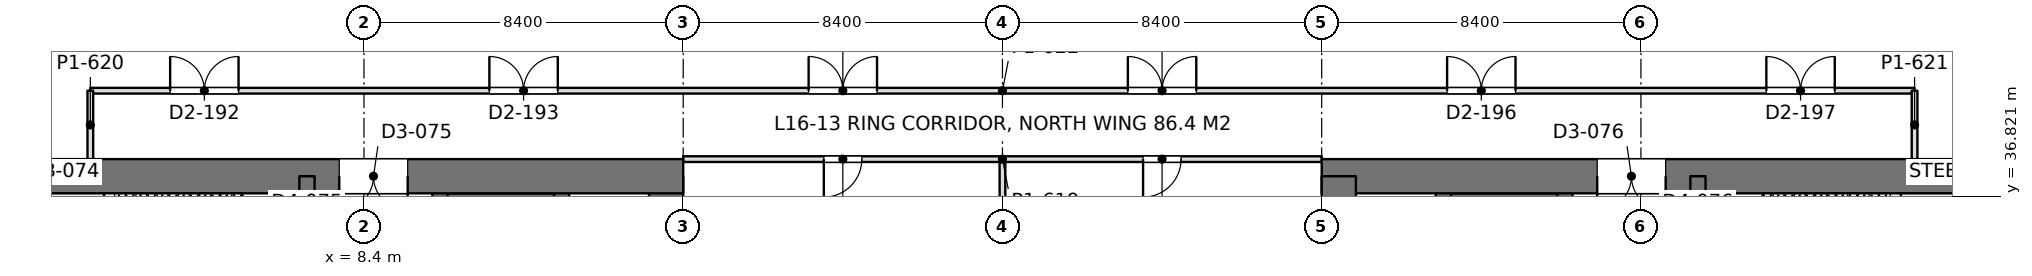
"""IFC4 building model, lengths in metres.
Left out: names, types, materials, properties, quantities, classifications, styles, units other than length and angle.
Written with IfcOpenShell. Run it as: python <this file> out.ifc"""

import sys

from ifc_helpers import new_model, si_unit, direction, frame, frame_2d, origin, place, context, subcontext, project, spatial, rectangle, extrude, element, fill, save


model = new_model("IFC4")
c1 = context("Model", 3, precision=1e-05, world=origin(), true_north=direction((0.0, 1.0)))
c2 = subcontext(c1, "Body", "Model", "MODEL_VIEW")
j1 = project(units=[si_unit("LENGTHUNIT", "METRE"), si_unit("PLANEANGLEUNIT", "RADIAN")], contexts=[c1])
p1 = place(None, origin())
s1 = spatial("IfcSite", under=j1, at=p1, CompositionType="ELEMENT")
p2 = place(p1, origin())
s2 = spatial("IfcBuilding", under=s1, at=p2, CompositionType="ELEMENT")
p3 = place(p2, frame((0.0, 0.0, 72.9)))
s3 = spatial("IfcBuildingStorey", under=s2, at=p3, CompositionType="ELEMENT", Elevation=72.9)
p4 = place(p3, frame((-1.2, 37.35, 0.0), z_axis=(0.0, 0.0, 1.0), x_axis=(1.0, 0.0, 0.0)))
e1 = element("IfcWall", 1, at=p4, inside=s3, PredefinedType="SHEAR", context=c2, shape_type="SweptSolid", body=[
    extrude(rectangle(XDim=18.0, YDim=0.9, at=frame_2d((9.0, 0.0))), origin(), (0.0, 0.0, 1.0), 4.5),
])
p5 = place(p4, frame((8.95, 0.0, 0.0)))
e2 = element("IfcOpeningElement", 2, at=p5, cuts=e1, PredefinedType="OPENING", context=c2, shape_type="SweptSolid", body=[
    extrude(rectangle(XDim=1.8, YDim=2.4, at=frame_2d((0.9, 1.2))), frame((0.0, 0.46, 0.0), z_axis=(0.0, -1.0, 0.0), x_axis=(1.0, 0.0, 0.0)), (0.0, 0.0, 1.0), 0.92),
])
p6 = place(p3, frame((16.35, 13.05, 0.0), z_axis=(0.0, 0.0, 1.0), x_axis=(0.0, 1.0, 0.0)))
e3 = element("IfcWall", 3, at=p6, inside=s3, PredefinedType="SHEAR", context=c2, shape_type="SweptSolid", body=[
    extrude(rectangle(XDim=24.3, YDim=0.9, at=frame_2d((12.15, 0.0))), origin(), (0.0, 0.0, 1.0), 4.5),
])
p7 = place(p3, frame((6.9, 13.05, 0.0), z_axis=(0.0, 0.0, 1.0), x_axis=(0.0, 1.0, 0.0)))
e4 = element("IfcWall", 4, at=p7, inside=s3, PredefinedType="SHEAR", context=c2, shape_type="SweptSolid", body=[
    extrude(rectangle(XDim=24.3, YDim=0.4, at=frame_2d((12.15, 0.0))), origin(), (0.0, 0.0, 1.0), 4.5),
])
p8 = place(p7, frame((1.3, 0.0, 0.0)))
e5 = element("IfcOpeningElement", 5, at=p8, cuts=e4, PredefinedType="OPENING", context=c2, shape_type="SweptSolid", body=[
    extrude(rectangle(XDim=1.0, YDim=2.2, at=frame_2d((0.5, 1.1))), frame((0.0, 0.21, 0.0), z_axis=(0.0, -1.0, 0.0), x_axis=(1.0, 0.0, 0.0)), (0.0, 0.0, 1.0), 0.42),
])
p9 = place(p7, frame((22.0, 0.0, 0.0)))
e6 = element("IfcOpeningElement", 6, at=p9, cuts=e4, PredefinedType="OPENING", context=c2, shape_type="SweptSolid", body=[
    extrude(rectangle(XDim=1.0, YDim=2.2, at=frame_2d((0.5, 1.1))), frame((0.0, 0.21, 0.0), z_axis=(0.0, -1.0, 0.0), x_axis=(1.0, 0.0, 0.0)), (0.0, 0.0, 1.0), 0.42),
])
p10 = place(p7, frame((5.55, 0.0, 0.0)))
e7 = element("IfcOpeningElement", 7, at=p10, cuts=e4, PredefinedType="OPENING", context=c2, shape_type="SweptSolid", body=[
    extrude(rectangle(XDim=1.0, YDim=2.2, at=frame_2d((0.5, 1.1))), frame((0.0, 0.21, 0.0), z_axis=(0.0, -1.0, 0.0), x_axis=(1.0, 0.0, 0.0)), (0.0, 0.0, 1.0), 0.42),
])
p11 = place(p7, frame((9.55, 0.0, 0.0)))
e8 = element("IfcOpeningElement", 8, at=p11, cuts=e4, PredefinedType="OPENING", context=c2, shape_type="SweptSolid", body=[
    extrude(rectangle(XDim=1.0, YDim=2.2, at=frame_2d((0.5, 1.1))), frame((0.0, 0.21, 0.0), z_axis=(0.0, -1.0, 0.0), x_axis=(1.0, 0.0, 0.0)), (0.0, 0.0, 1.0), 0.42),
])
p12 = place(p7, frame((12.8, 0.0, 0.0)))
e9 = element("IfcOpeningElement", 9, at=p12, cuts=e4, PredefinedType="OPENING", context=c2, shape_type="SweptSolid", body=[
    extrude(rectangle(XDim=1.1, YDim=2.2, at=frame_2d((0.55, 1.1))), frame((0.0, 0.21, 0.0), z_axis=(0.0, -1.0, 0.0), x_axis=(1.0, 0.0, 0.0)), (0.0, 0.0, 1.0), 0.42),
])
p13 = place(p7, frame((15.538, 0.0, 0.0)))
e10 = element("IfcOpeningElement", 10, at=p13, cuts=e4, PredefinedType="OPENING", context=c2, shape_type="SweptSolid", body=[
    extrude(rectangle(XDim=1.1, YDim=2.2, at=frame_2d((0.55, 1.1))), frame((0.0, 0.21, 0.0), z_axis=(0.0, -1.0, 0.0), x_axis=(1.0, 0.0, 0.0)), (0.0, 0.0, 1.0), 0.42),
])
p14 = place(p7, frame((18.262, 0.0, 0.0)))
e11 = element("IfcOpeningElement", 11, at=p14, cuts=e4, PredefinedType="OPENING", context=c2, shape_type="SweptSolid", body=[
    extrude(rectangle(XDim=1.1, YDim=2.2, at=frame_2d((0.55, 1.1))), frame((0.0, 0.21, 0.0), z_axis=(0.0, -1.0, 0.0), x_axis=(1.0, 0.0, 0.0)), (0.0, 0.0, 1.0), 0.42),
])
p15 = place(p3, frame((10.4, 13.05, 0.0), z_axis=(0.0, 0.0, 1.0), x_axis=(0.0, 1.0, 0.0)))
e12 = element("IfcWall", 12, at=p15, inside=s3, PredefinedType="SHEAR", context=c2, shape_type="SweptSolid", body=[
    extrude(rectangle(XDim=24.3, YDim=0.4, at=frame_2d((12.15, 0.0))), origin(), (0.0, 0.0, 1.0), 4.5),
])
p16 = place(p15, frame((1.5, 0.0, 0.0)))
e13 = element("IfcOpeningElement", 13, at=p16, cuts=e12, PredefinedType="OPENING", context=c2, shape_type="SweptSolid", body=[
    extrude(rectangle(XDim=1.1, YDim=2.2, at=frame_2d((0.55, 1.1))), frame((0.0, 0.21, 0.0), z_axis=(0.0, -1.0, 0.0), x_axis=(1.0, 0.0, 0.0)), (0.0, 0.0, 1.0), 0.42),
])
p17 = place(p15, frame((4.35, 0.0, 0.0)))
e14 = element("IfcOpeningElement", 14, at=p17, cuts=e12, PredefinedType="OPENING", context=c2, shape_type="SweptSolid", body=[
    extrude(rectangle(XDim=1.1, YDim=2.2, at=frame_2d((0.55, 1.1))), frame((0.0, 0.21, 0.0), z_axis=(0.0, -1.0, 0.0), x_axis=(1.0, 0.0, 0.0)), (0.0, 0.0, 1.0), 0.42),
])
p18 = place(p15, frame((7.2, 0.0, 0.0)))
e15 = element("IfcOpeningElement", 15, at=p18, cuts=e12, PredefinedType="OPENING", context=c2, shape_type="SweptSolid", body=[
    extrude(rectangle(XDim=1.1, YDim=2.2, at=frame_2d((0.55, 1.1))), frame((0.0, 0.21, 0.0), z_axis=(0.0, -1.0, 0.0), x_axis=(1.0, 0.0, 0.0)), (0.0, 0.0, 1.0), 0.42),
])
p19 = place(p15, frame((21.45, 0.0, 0.0)))
e16 = element("IfcOpeningElement", 16, at=p19, cuts=e12, PredefinedType="OPENING", context=c2, shape_type="SweptSolid", body=[
    extrude(rectangle(XDim=1.1, YDim=2.2, at=frame_2d((0.55, 1.1))), frame((0.0, 0.21, 0.0), z_axis=(0.0, -1.0, 0.0), x_axis=(1.0, 0.0, 0.0)), (0.0, 0.0, 1.0), 0.42),
])
p20 = place(p3, frame((13.6, 13.05, 0.0), z_axis=(0.0, 0.0, 1.0), x_axis=(0.0, 1.0, 0.0)))
e17 = element("IfcWall", 17, at=p20, inside=s3, PredefinedType="SHEAR", context=c2, shape_type="SweptSolid", body=[
    extrude(rectangle(XDim=24.3, YDim=0.4, at=frame_2d((12.15, 0.0))), origin(), (0.0, 0.0, 1.0), 4.5),
])
p21 = place(p3, frame((10.4, 36.625, 0.0), z_axis=(0.0, 0.0, 1.0), x_axis=(1.0, 0.0, 0.0)))
e18 = element("IfcWall", 18, at=p21, inside=s3, PredefinedType="SHEAR", context=c2, shape_type="SweptSolid", body=[
    extrude(rectangle(XDim=3.2, YDim=0.55, at=frame_2d((1.6, 0.0))), origin(), (0.0, 0.0, 1.0), 4.5),
])
p22 = place(p3, frame((33.6, 37.35, 0.0), z_axis=(0.0, 0.0, 1.0), x_axis=(1.0, 0.0, 0.0)))
e19 = element("IfcWall", 19, at=p22, inside=s3, PredefinedType="SHEAR", context=c2, shape_type="SweptSolid", body=[
    extrude(rectangle(XDim=18.0, YDim=0.9, at=frame_2d((9.0, 0.0))), origin(), (0.0, 0.0, 1.0), 4.5),
])
p23 = place(p22, frame((7.25, 0.0, 0.0)))
e20 = element("IfcOpeningElement", 20, at=p23, cuts=e19, PredefinedType="OPENING", context=c2, shape_type="SweptSolid", body=[
    extrude(rectangle(XDim=1.8, YDim=2.4, at=frame_2d((0.9, 1.2))), frame((0.0, 0.46, 0.0), z_axis=(0.0, -1.0, 0.0), x_axis=(1.0, 0.0, 0.0)), (0.0, 0.0, 1.0), 0.92),
])
p24 = place(p3, frame((34.05, 13.05, 0.0), z_axis=(0.0, 0.0, 1.0), x_axis=(0.0, 1.0, 0.0)))
e21 = element("IfcWall", 21, at=p24, inside=s3, PredefinedType="SHEAR", context=c2, shape_type="SweptSolid", body=[
    extrude(rectangle(XDim=24.3, YDim=0.9, at=frame_2d((12.15, 0.0))), origin(), (0.0, 0.0, 1.0), 4.5),
])
p25 = place(p3, frame((43.5, 13.05, 0.0), z_axis=(0.0, 0.0, 1.0), x_axis=(0.0, 1.0, 0.0)))
e22 = element("IfcWall", 22, at=p25, inside=s3, PredefinedType="SHEAR", context=c2, shape_type="SweptSolid", body=[
    extrude(rectangle(XDim=24.3, YDim=0.4, at=frame_2d((12.15, 0.0))), origin(), (0.0, 0.0, 1.0), 4.5),
])
p26 = place(p25, frame((1.3, 0.0, 0.0)))
e23 = element("IfcOpeningElement", 23, at=p26, cuts=e22, PredefinedType="OPENING", context=c2, shape_type="SweptSolid", body=[
    extrude(rectangle(XDim=1.0, YDim=2.2, at=frame_2d((0.5, 1.1))), frame((0.0, 0.21, 0.0), z_axis=(0.0, -1.0, 0.0), x_axis=(1.0, 0.0, 0.0)), (0.0, 0.0, 1.0), 0.42),
])
p27 = place(p25, frame((22.0, 0.0, 0.0)))
e24 = element("IfcOpeningElement", 24, at=p27, cuts=e22, PredefinedType="OPENING", context=c2, shape_type="SweptSolid", body=[
    extrude(rectangle(XDim=1.0, YDim=2.2, at=frame_2d((0.5, 1.1))), frame((0.0, 0.21, 0.0), z_axis=(0.0, -1.0, 0.0), x_axis=(1.0, 0.0, 0.0)), (0.0, 0.0, 1.0), 0.42),
])
p28 = place(p25, frame((5.55, 0.0, 0.0)))
e25 = element("IfcOpeningElement", 25, at=p28, cuts=e22, PredefinedType="OPENING", context=c2, shape_type="SweptSolid", body=[
    extrude(rectangle(XDim=1.0, YDim=2.2, at=frame_2d((0.5, 1.1))), frame((0.0, 0.21, 0.0), z_axis=(0.0, -1.0, 0.0), x_axis=(1.0, 0.0, 0.0)), (0.0, 0.0, 1.0), 0.42),
])
p29 = place(p25, frame((9.55, 0.0, 0.0)))
e26 = element("IfcOpeningElement", 26, at=p29, cuts=e22, PredefinedType="OPENING", context=c2, shape_type="SweptSolid", body=[
    extrude(rectangle(XDim=1.0, YDim=2.2, at=frame_2d((0.5, 1.1))), frame((0.0, 0.21, 0.0), z_axis=(0.0, -1.0, 0.0), x_axis=(1.0, 0.0, 0.0)), (0.0, 0.0, 1.0), 0.42),
])
p30 = place(p25, frame((12.8, 0.0, 0.0)))
e27 = element("IfcOpeningElement", 27, at=p30, cuts=e22, PredefinedType="OPENING", context=c2, shape_type="SweptSolid", body=[
    extrude(rectangle(XDim=1.1, YDim=2.2, at=frame_2d((0.55, 1.1))), frame((0.0, 0.21, 0.0), z_axis=(0.0, -1.0, 0.0), x_axis=(1.0, 0.0, 0.0)), (0.0, 0.0, 1.0), 0.42),
])
p31 = place(p25, frame((15.538, 0.0, 0.0)))
e28 = element("IfcOpeningElement", 28, at=p31, cuts=e22, PredefinedType="OPENING", context=c2, shape_type="SweptSolid", body=[
    extrude(rectangle(XDim=1.1, YDim=2.2, at=frame_2d((0.55, 1.1))), frame((0.0, 0.21, 0.0), z_axis=(0.0, -1.0, 0.0), x_axis=(1.0, 0.0, 0.0)), (0.0, 0.0, 1.0), 0.42),
])
p32 = place(p25, frame((18.262, 0.0, 0.0)))
e29 = element("IfcOpeningElement", 29, at=p32, cuts=e22, PredefinedType="OPENING", context=c2, shape_type="SweptSolid", body=[
    extrude(rectangle(XDim=1.1, YDim=2.2, at=frame_2d((0.55, 1.1))), frame((0.0, 0.21, 0.0), z_axis=(0.0, -1.0, 0.0), x_axis=(1.0, 0.0, 0.0)), (0.0, 0.0, 1.0), 0.42),
])
p33 = place(p3, frame((40.0, 13.05, 0.0), z_axis=(0.0, 0.0, 1.0), x_axis=(0.0, 1.0, 0.0)))
e30 = element("IfcWall", 30, at=p33, inside=s3, PredefinedType="SHEAR", context=c2, shape_type="SweptSolid", body=[
    extrude(rectangle(XDim=24.3, YDim=0.4, at=frame_2d((12.15, 0.0))), origin(), (0.0, 0.0, 1.0), 4.5),
])
p34 = place(p33, frame((1.5, 0.0, 0.0)))
e31 = element("IfcOpeningElement", 31, at=p34, cuts=e30, PredefinedType="OPENING", context=c2, shape_type="SweptSolid", body=[
    extrude(rectangle(XDim=1.1, YDim=2.2, at=frame_2d((0.55, 1.1))), frame((0.0, 0.21, 0.0), z_axis=(0.0, -1.0, 0.0), x_axis=(1.0, 0.0, 0.0)), (0.0, 0.0, 1.0), 0.42),
])
p35 = place(p33, frame((4.35, 0.0, 0.0)))
e32 = element("IfcOpeningElement", 32, at=p35, cuts=e30, PredefinedType="OPENING", context=c2, shape_type="SweptSolid", body=[
    extrude(rectangle(XDim=1.1, YDim=2.2, at=frame_2d((0.55, 1.1))), frame((0.0, 0.21, 0.0), z_axis=(0.0, -1.0, 0.0), x_axis=(1.0, 0.0, 0.0)), (0.0, 0.0, 1.0), 0.42),
])
p36 = place(p33, frame((7.2, 0.0, 0.0)))
e33 = element("IfcOpeningElement", 33, at=p36, cuts=e30, PredefinedType="OPENING", context=c2, shape_type="SweptSolid", body=[
    extrude(rectangle(XDim=1.1, YDim=2.2, at=frame_2d((0.55, 1.1))), frame((0.0, 0.21, 0.0), z_axis=(0.0, -1.0, 0.0), x_axis=(1.0, 0.0, 0.0)), (0.0, 0.0, 1.0), 0.42),
])
p37 = place(p33, frame((21.45, 0.0, 0.0)))
e34 = element("IfcOpeningElement", 34, at=p37, cuts=e30, PredefinedType="OPENING", context=c2, shape_type="SweptSolid", body=[
    extrude(rectangle(XDim=1.1, YDim=2.2, at=frame_2d((0.55, 1.1))), frame((0.0, 0.21, 0.0), z_axis=(0.0, -1.0, 0.0), x_axis=(1.0, 0.0, 0.0)), (0.0, 0.0, 1.0), 0.42),
])
p38 = place(p3, frame((36.8, 13.05, 0.0), z_axis=(0.0, 0.0, 1.0), x_axis=(0.0, 1.0, 0.0)))
e35 = element("IfcWall", 35, at=p38, inside=s3, PredefinedType="SHEAR", context=c2, shape_type="SweptSolid", body=[
    extrude(rectangle(XDim=24.3, YDim=0.4, at=frame_2d((12.15, 0.0))), origin(), (0.0, 0.0, 1.0), 4.5),
])
p39 = place(p3, frame((40.0, 36.625, 0.0), z_axis=(0.0, 0.0, 1.0), x_axis=(-1.0, 0.0, 0.0)))
e36 = element("IfcWall", 36, at=p39, inside=s3, PredefinedType="SHEAR", context=c2, shape_type="SweptSolid", body=[
    extrude(rectangle(XDim=3.2, YDim=0.55, at=frame_2d((1.6, 0.0))), origin(), (0.0, 0.0, 1.0), 4.5),
])
p40 = place(p3, frame((1.2, 39.6, 0.0), z_axis=(0.0, 0.0, 1.0), x_axis=(1.0, 0.0, 0.0)))
e37 = element("IfcWall", 37, at=p40, inside=s3, PredefinedType="PARTITIONING", context=c2, shape_type="SweptSolid", body=[
    extrude(rectangle(XDim=48.0, YDim=0.15, at=frame_2d((24.0, 0.0))), origin(), (0.0, 0.0, 1.0), 3.74),
])
p41 = place(p40, frame((2.1, 0.0, 0.0)))
e38 = element("IfcOpeningElement", 38, at=p41, cuts=e37, PredefinedType="OPENING", context=c2, shape_type="SweptSolid", body=[
    extrude(rectangle(XDim=1.8, YDim=2.2, at=frame_2d((0.9, 1.1))), frame((0.0, 0.085, 0.0), z_axis=(0.0, -1.0, 0.0), x_axis=(1.0, 0.0, 0.0)), (0.0, 0.0, 1.0), 0.17),
])
p42 = place(p40, frame((10.5, 0.0, 0.0)))
e39 = element("IfcOpeningElement", 39, at=p42, cuts=e37, PredefinedType="OPENING", context=c2, shape_type="SweptSolid", body=[
    extrude(rectangle(XDim=1.8, YDim=2.2, at=frame_2d((0.9, 1.1))), frame((0.0, 0.085, 0.0), z_axis=(0.0, -1.0, 0.0), x_axis=(1.0, 0.0, 0.0)), (0.0, 0.0, 1.0), 0.17),
])
p43 = place(p40, frame((18.9, 0.0, 0.0)))
e40 = element("IfcOpeningElement", 40, at=p43, cuts=e37, PredefinedType="OPENING", context=c2, shape_type="SweptSolid", body=[
    extrude(rectangle(XDim=1.8, YDim=2.2, at=frame_2d((0.9, 1.1))), frame((0.0, 0.085, 0.0), z_axis=(0.0, -1.0, 0.0), x_axis=(1.0, 0.0, 0.0)), (0.0, 0.0, 1.0), 0.17),
])
p44 = place(p40, frame((27.3, 0.0, 0.0)))
e41 = element("IfcOpeningElement", 41, at=p44, cuts=e37, PredefinedType="OPENING", context=c2, shape_type="SweptSolid", body=[
    extrude(rectangle(XDim=1.8, YDim=2.2, at=frame_2d((0.9, 1.1))), frame((0.0, 0.085, 0.0), z_axis=(0.0, -1.0, 0.0), x_axis=(1.0, 0.0, 0.0)), (0.0, 0.0, 1.0), 0.17),
])
p45 = place(p40, frame((35.7, 0.0, 0.0)))
e42 = element("IfcOpeningElement", 42, at=p45, cuts=e37, PredefinedType="OPENING", context=c2, shape_type="SweptSolid", body=[
    extrude(rectangle(XDim=1.8, YDim=2.2, at=frame_2d((0.9, 1.1))), frame((0.0, 0.085, 0.0), z_axis=(0.0, -1.0, 0.0), x_axis=(1.0, 0.0, 0.0)), (0.0, 0.0, 1.0), 0.17),
])
p46 = place(p40, frame((44.1, 0.0, 0.0)))
e43 = element("IfcOpeningElement", 43, at=p46, cuts=e37, PredefinedType="OPENING", context=c2, shape_type="SweptSolid", body=[
    extrude(rectangle(XDim=1.8, YDim=2.2, at=frame_2d((0.9, 1.1))), frame((0.0, 0.085, 0.0), z_axis=(0.0, -1.0, 0.0), x_axis=(1.0, 0.0, 0.0)), (0.0, 0.0, 1.0), 0.17),
])
for number, where, z_axis, x_axis in (
    (44, (1.2, 37.8, 0.0), (0.0, 0.0, 1.0), (0.0, 1.0, 0.0)),
    (45, (49.2, 37.8, 0.0), (0.0, 0.0, 1.0), (0.0, 1.0, 0.0)),
):
    element("IfcWall", number, at=place(p3, frame(where, z_axis=z_axis, x_axis=x_axis)), inside=s3, PredefinedType="PARTITIONING", context=c2, shape_type="SweptSolid", body=[
        extrude(rectangle(XDim=1.8, YDim=0.15, at=frame_2d((0.9, 0.0))), origin(), (0.0, 0.0, 1.0), 4.34),
    ])
p47 = place(p3, frame((16.798, 37.8, 0.0), z_axis=(0.0, 0.0, 1.0), x_axis=(1.0, 0.0, 0.0)))
e46 = element("IfcWall", 46, at=p47, inside=s3, PredefinedType="PARTITIONING", context=c2, shape_type="SweptSolid", body=[
    extrude(rectangle(XDim=16.804, YDim=0.15, at=frame_2d((8.402, 0.0))), origin(), (0.0, 0.0, 1.0), 3.74),
])
p48 = place(p47, frame((3.702, 0.0, 0.0)))
e47 = element("IfcOpeningElement", 47, at=p48, cuts=e46, PredefinedType="OPENING", context=c2, shape_type="SweptSolid", body=[
    extrude(rectangle(XDim=1.0, YDim=2.2, at=frame_2d((0.5, 1.1))), frame((0.0, 0.085, 0.0), z_axis=(0.0, -1.0, 0.0), x_axis=(1.0, 0.0, 0.0)), (0.0, 0.0, 1.0), 0.17),
])
p49 = place(p47, frame((12.102, 0.0, 0.0)))
e48 = element("IfcOpeningElement", 48, at=p49, cuts=e46, PredefinedType="OPENING", context=c2, shape_type="SweptSolid", body=[
    extrude(rectangle(XDim=1.0, YDim=2.2, at=frame_2d((0.5, 1.1))), frame((0.0, 0.085, 0.0), z_axis=(0.0, -1.0, 0.0), x_axis=(1.0, 0.0, 0.0)), (0.0, 0.0, 1.0), 0.17),
])
p50 = place(p3, frame((25.2, 34.199, 0.0), z_axis=(0.0, 0.0, 1.0), x_axis=(0.0, 1.0, 0.0)))
e49 = element("IfcWall", 49, at=p50, inside=s3, PredefinedType="PARTITIONING", context=c2, shape_type="SweptSolid", body=[
    extrude(rectangle(XDim=3.527, YDim=0.15, at=frame_2d((1.764, 0.0))), origin(), (0.0, 0.0, 1.0), 3.74),
])
p51 = place(p5, frame((1.8, 0.0, 0.0), z_axis=(0.0, 0.0, 1.0), x_axis=(-1.0, 0.0, 0.0)))
e50 = element("IfcDoor", 50, at=p51, inside=s3, OperationType="DOUBLE_DOOR_SINGLE_SWING", PredefinedType="DOOR", context=c2, shape_type="SweptSolid", body=[
    extrude(rectangle(XDim=1.8, YDim=2.4, at=frame_2d((0.9, 1.2))), frame((0.0, 0.025, 0.0), z_axis=(0.0, -1.0, 0.0), x_axis=(1.0, 0.0, 0.0)), (0.0, 0.0, 1.0), 0.05),
])
fill(e2, e50)
p52 = place(p23, frame((1.8, 0.0, 0.0), z_axis=(0.0, 0.0, 1.0), x_axis=(-1.0, 0.0, 0.0)))
e51 = element("IfcDoor", 51, at=p52, inside=s3, OperationType="DOUBLE_DOOR_SINGLE_SWING", PredefinedType="DOOR", context=c2, shape_type="SweptSolid", body=[
    extrude(rectangle(XDim=1.8, YDim=2.4, at=frame_2d((0.9, 1.2))), frame((0.0, 0.025, 0.0), z_axis=(0.0, -1.0, 0.0), x_axis=(1.0, 0.0, 0.0)), (0.0, 0.0, 1.0), 0.05),
])
fill(e20, e51)
p53 = place(p41, origin())
e52 = element("IfcDoor", 52, at=p53, inside=s3, OperationType="DOUBLE_DOOR_SINGLE_SWING", PredefinedType="DOOR", context=c2, shape_type="SweptSolid", body=[
    extrude(rectangle(XDim=1.8, YDim=2.2, at=frame_2d((0.9, 1.1))), frame((0.0, 0.025, 0.0), z_axis=(0.0, -1.0, 0.0), x_axis=(1.0, 0.0, 0.0)), (0.0, 0.0, 1.0), 0.05),
])
fill(e38, e52)
p54 = place(p42, origin())
e53 = element("IfcDoor", 53, at=p54, inside=s3, OperationType="DOUBLE_DOOR_SINGLE_SWING", PredefinedType="DOOR", context=c2, shape_type="SweptSolid", body=[
    extrude(rectangle(XDim=1.8, YDim=2.2, at=frame_2d((0.9, 1.1))), frame((0.0, 0.025, 0.0), z_axis=(0.0, -1.0, 0.0), x_axis=(1.0, 0.0, 0.0)), (0.0, 0.0, 1.0), 0.05),
])
fill(e39, e53)
p55 = place(p43, origin())
e54 = element("IfcDoor", 54, at=p55, inside=s3, OperationType="DOUBLE_DOOR_SINGLE_SWING", PredefinedType="DOOR", context=c2, shape_type="SweptSolid", body=[
    extrude(rectangle(XDim=1.8, YDim=2.2, at=frame_2d((0.9, 1.1))), frame((0.0, 0.025, 0.0), z_axis=(0.0, -1.0, 0.0), x_axis=(1.0, 0.0, 0.0)), (0.0, 0.0, 1.0), 0.05),
])
fill(e40, e54)
p56 = place(p44, origin())
e55 = element("IfcDoor", 55, at=p56, inside=s3, OperationType="DOUBLE_DOOR_SINGLE_SWING", PredefinedType="DOOR", context=c2, shape_type="SweptSolid", body=[
    extrude(rectangle(XDim=1.8, YDim=2.2, at=frame_2d((0.9, 1.1))), frame((0.0, 0.025, 0.0), z_axis=(0.0, -1.0, 0.0), x_axis=(1.0, 0.0, 0.0)), (0.0, 0.0, 1.0), 0.05),
])
fill(e41, e55)
p57 = place(p45, origin())
e56 = element("IfcDoor", 56, at=p57, inside=s3, OperationType="DOUBLE_DOOR_SINGLE_SWING", PredefinedType="DOOR", context=c2, shape_type="SweptSolid", body=[
    extrude(rectangle(XDim=1.8, YDim=2.2, at=frame_2d((0.9, 1.1))), frame((0.0, 0.025, 0.0), z_axis=(0.0, -1.0, 0.0), x_axis=(1.0, 0.0, 0.0)), (0.0, 0.0, 1.0), 0.05),
])
fill(e42, e56)
p58 = place(p46, origin())
e57 = element("IfcDoor", 57, at=p58, inside=s3, OperationType="DOUBLE_DOOR_SINGLE_SWING", PredefinedType="DOOR", context=c2, shape_type="SweptSolid", body=[
    extrude(rectangle(XDim=1.8, YDim=2.2, at=frame_2d((0.9, 1.1))), frame((0.0, 0.025, 0.0), z_axis=(0.0, -1.0, 0.0), x_axis=(1.0, 0.0, 0.0)), (0.0, 0.0, 1.0), 0.05),
])
fill(e43, e57)
p59 = place(p48, frame((1.0, 0.0, 0.0), z_axis=(0.0, 0.0, 1.0), x_axis=(-1.0, 0.0, 0.0)))
e58 = element("IfcDoor", 58, at=p59, inside=s3, OperationType="SINGLE_SWING_RIGHT", PredefinedType="DOOR", context=c2, shape_type="SweptSolid", body=[
    extrude(rectangle(XDim=1.0, YDim=2.2, at=frame_2d((0.5, 1.1))), frame((0.0, 0.025, 0.0), z_axis=(0.0, -1.0, 0.0), x_axis=(1.0, 0.0, 0.0)), (0.0, 0.0, 1.0), 0.05),
])
fill(e47, e58)
p60 = place(p49, frame((1.0, 0.0, 0.0), z_axis=(0.0, 0.0, 1.0), x_axis=(-1.0, 0.0, 0.0)))
e59 = element("IfcDoor", 59, at=p60, inside=s3, OperationType="SINGLE_SWING_RIGHT", PredefinedType="DOOR", context=c2, shape_type="SweptSolid", body=[
    extrude(rectangle(XDim=1.0, YDim=2.2, at=frame_2d((0.5, 1.1))), frame((0.0, 0.025, 0.0), z_axis=(0.0, -1.0, 0.0), x_axis=(1.0, 0.0, 0.0)), (0.0, 0.0, 1.0), 0.05),
])
fill(e48, e59)
save(model, sys.argv[1])
